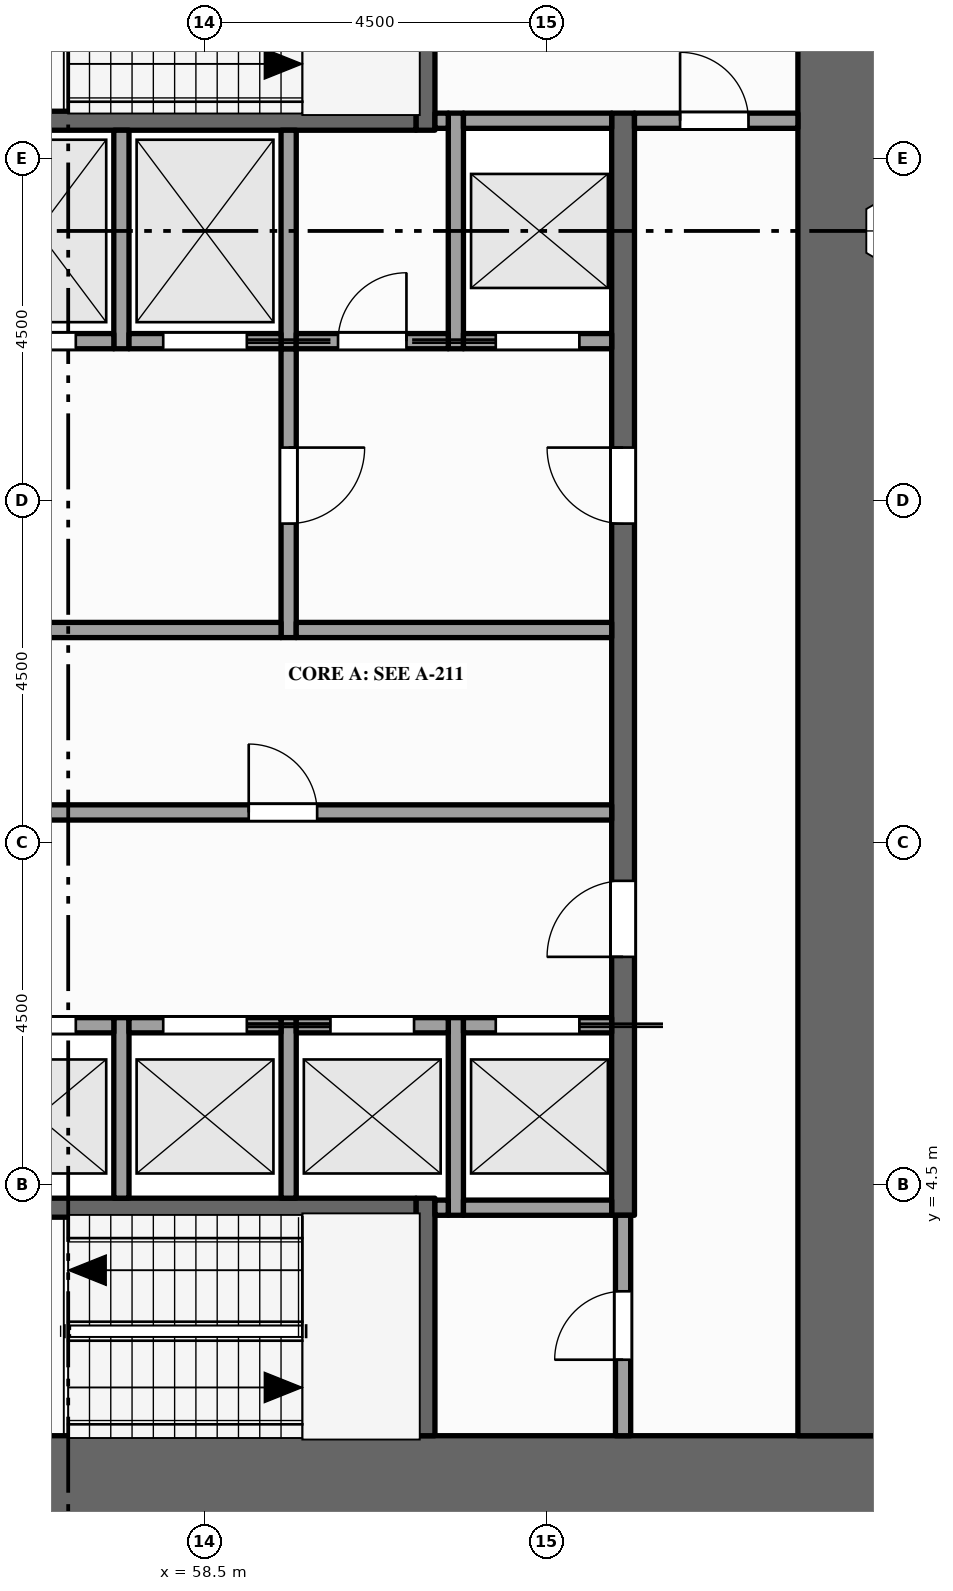
"""IFC4 building model, lengths in metres.
Left out: names, types, materials, properties, quantities, classifications, styles, units other than length and angle.
Written with IfcOpenShell. Run it as: python <this file> out.ifc"""

import sys

from ifc_helpers import new_model, si_unit, direction, frame, frame_2d, origin, place, context, subcontext, project, spatial, rectangle, extrude, element, fill, save


model = new_model("IFC4")
c1 = context("Model", 3, precision=1e-05, world=origin(), true_north=direction((0.0, 1.0)))
c2 = subcontext(c1, "Body", "Model", "MODEL_VIEW")
j1 = project(units=[si_unit("LENGTHUNIT", "METRE"), si_unit("PLANEANGLEUNIT", "RADIAN")], contexts=[c1])
p1 = place(None, origin())
s1 = spatial("IfcSite", under=j1, at=p1, CompositionType="ELEMENT")
p2 = place(p1, origin())
s2 = spatial("IfcBuilding", under=s1, at=p2, CompositionType="ELEMENT")
p3 = place(p2, frame((0.0, 0.0, 57.0)))
s3 = spatial("IfcBuildingStorey", under=s2, at=p3, CompositionType="ELEMENT", Elevation=57.0)
p4 = place(p3, frame((67.5, 0.6, -0.15), z_axis=(0.0, 0.0, 1.0), x_axis=(-1.0, 0.0, 0.0)))
e1 = element("IfcWall", 1, at=p4, inside=s3, PredefinedType="SHEAR", context=c2, shape_type="SweptSolid", body=[
    extrude(rectangle(XDim=13.5, YDim=1.2, at=frame_2d((6.75, 0.0))), origin(), (0.0, 0.0, 1.0), 4.0),
])
p5 = place(p3, frame((66.9, 1.2, -0.15), z_axis=(0.0, 0.0, 1.0), x_axis=(0.0, 1.0, 0.0)))
e2 = element("IfcWall", 2, at=p5, inside=s3, PredefinedType="SHEAR", context=c2, shape_type="SweptSolid", body=[
    extrude(rectangle(XDim=20.1, YDim=1.2, at=frame_2d((10.05, 0.0))), origin(), (0.0, 0.0, 1.0), 4.0),
])
p6 = place(p3, frame((57.4, 4.325, 0.0), z_axis=(0.0, 0.0, 1.0), x_axis=(0.0, 1.0, 0.0)))
e3 = element("IfcWall", 3, at=p6, inside=s3, PredefinedType="SOLIDWALL", context=c2, shape_type="SweptSolid", body=[
    extrude(rectangle(XDim=2.375, YDim=0.2, at=frame_2d((1.188, 0.0))), origin(), (0.0, 0.0, 1.0), 3.85),
])
p7 = place(p3, frame((57.4, 15.5, 0.0), z_axis=(0.0, 0.0, 1.0), x_axis=(0.0, 1.0, 0.0)))
e4 = element("IfcWall", 4, at=p7, inside=s3, PredefinedType="SOLIDWALL", context=c2, shape_type="SweptSolid", body=[
    extrude(rectangle(XDim=2.875, YDim=0.2, at=frame_2d((1.438, 0.0))), origin(), (0.0, 0.0, 1.0), 3.85),
])
p8 = place(p3, frame((59.6, 4.325, 0.0), z_axis=(0.0, 0.0, 1.0), x_axis=(0.0, 1.0, 0.0)))
e5 = element("IfcWall", 5, at=p8, inside=s3, PredefinedType="SOLIDWALL", context=c2, shape_type="SweptSolid", body=[
    extrude(rectangle(XDim=2.375, YDim=0.2, at=frame_2d((1.188, 0.0))), origin(), (0.0, 0.0, 1.0), 3.85),
])
p9 = place(p3, frame((59.6, 11.7, 0.0), z_axis=(0.0, 0.0, 1.0), x_axis=(0.0, 1.0, 0.0)))
e6 = element("IfcWall", 6, at=p9, inside=s3, PredefinedType="PARTITIONING", context=c2, shape_type="SweptSolid", body=[
    extrude(rectangle(XDim=3.8, YDim=0.2, at=frame_2d((1.9, 0.0))), origin(), (0.0, 0.0, 1.0), 3.85),
])
p10 = place(p9, frame((1.5, 0.0, 0.0)))
e7 = element("IfcOpeningElement", 7, at=p10, cuts=e6, PredefinedType="OPENING", context=c2, shape_type="SweptSolid", body=[
    extrude(rectangle(XDim=1.0, YDim=2.1, at=frame_2d((0.5, 1.05))), frame((0.0, 0.11, 0.0), z_axis=(0.0, -1.0, 0.0), x_axis=(1.0, 0.0, 0.0)), (0.0, 0.0, 1.0), 0.22),
])
p11 = place(p3, frame((59.6, 15.5, 0.0), z_axis=(0.0, 0.0, 1.0), x_axis=(0.0, 1.0, 0.0)))
e8 = element("IfcWall", 8, at=p11, inside=s3, PredefinedType="SOLIDWALL", context=c2, shape_type="SweptSolid", body=[
    extrude(rectangle(XDim=2.875, YDim=0.2, at=frame_2d((1.438, 0.0))), origin(), (0.0, 0.0, 1.0), 3.85),
])
p12 = place(p3, frame((61.4, 1.2, 0.0), z_axis=(0.0, 0.0, 1.0), x_axis=(0.0, 1.0, 0.0)))
e9 = element("IfcWall", 9, at=p12, inside=s3, PredefinedType="SHEAR", context=c2, shape_type="SweptSolid", body=[
    extrude(rectangle(XDim=3.125, YDim=0.25, at=frame_2d((1.562, 0.0))), origin(), (0.0, 0.0, 1.0), 3.85),
])
p13 = place(p3, frame((61.4, 18.375, 0.0), z_axis=(0.0, 0.0, 1.0), x_axis=(0.0, 1.0, 0.0)))
e10 = element("IfcWall", 10, at=p13, inside=s3, PredefinedType="SHEAR", context=c2, shape_type="SweptSolid", body=[
    extrude(rectangle(XDim=2.925, YDim=0.25, at=frame_2d((1.462, 0.0))), origin(), (0.0, 0.0, 1.0), 3.85),
])
p14 = place(p3, frame((61.8, 4.1, 0.0), z_axis=(0.0, 0.0, 1.0), x_axis=(0.0, 1.0, 0.0)))
e11 = element("IfcWall", 11, at=p14, inside=s3, PredefinedType="SOLIDWALL", context=c2, shape_type="SweptSolid", body=[
    extrude(rectangle(XDim=2.6, YDim=0.2, at=frame_2d((1.3, 0.0))), origin(), (0.0, 0.0, 1.0), 3.85),
])
p15 = place(p3, frame((61.8, 15.5, 0.0), z_axis=(0.0, 0.0, 1.0), x_axis=(0.0, 1.0, 0.0)))
e12 = element("IfcWall", 12, at=p15, inside=s3, PredefinedType="SOLIDWALL", context=c2, shape_type="SweptSolid", body=[
    extrude(rectangle(XDim=3.1, YDim=0.2, at=frame_2d((1.55, 0.0))), origin(), (0.0, 0.0, 1.0), 3.85),
])
p16 = place(p3, frame((64.0, 1.2, 0.0), z_axis=(0.0, 0.0, 1.0), x_axis=(0.0, 1.0, 0.0)))
e13 = element("IfcWall", 13, at=p16, inside=s3, PredefinedType="PARTITIONING", context=c2, shape_type="SweptSolid", body=[
    extrude(rectangle(XDim=2.9, YDim=0.2, at=frame_2d((1.45, 0.0))), origin(), (0.0, 0.0, 1.0), 3.85),
])
p17 = place(p16, frame((1.0, 0.0, 0.0)))
e14 = element("IfcOpeningElement", 14, at=p17, cuts=e13, PredefinedType="OPENING", context=c2, shape_type="SweptSolid", body=[
    extrude(rectangle(XDim=0.9, YDim=2.1, at=frame_2d((0.45, 1.05))), frame((0.0, 0.11, 0.0), z_axis=(0.0, -1.0, 0.0), x_axis=(1.0, 0.0, 0.0)), (0.0, 0.0, 1.0), 0.22),
])
p18 = place(p3, frame((64.0, 4.1, 0.0), z_axis=(0.0, 0.0, 1.0), x_axis=(0.0, 1.0, 0.0)))
e15 = element("IfcWall", 15, at=p18, inside=s3, PredefinedType="SHEAR", context=c2, shape_type="SweptSolid", body=[
    extrude(rectangle(XDim=14.5, YDim=0.3, at=frame_2d((7.25, 0.0))), origin(), (0.0, 0.0, 1.0), 3.85),
])
p19 = place(p18, frame((3.4, 0.0, 0.0)))
e16 = element("IfcOpeningElement", 16, at=p19, cuts=e15, PredefinedType="OPENING", context=c2, shape_type="SweptSolid", body=[
    extrude(rectangle(XDim=1.0, YDim=2.1, at=frame_2d((0.5, 1.05))), frame((0.0, 0.16, 0.0), z_axis=(0.0, -1.0, 0.0), x_axis=(1.0, 0.0, 0.0)), (0.0, 0.0, 1.0), 0.32),
])
p20 = place(p18, frame((9.1, 0.0, 0.0)))
e17 = element("IfcOpeningElement", 17, at=p20, cuts=e15, PredefinedType="OPENING", context=c2, shape_type="SweptSolid", body=[
    extrude(rectangle(XDim=1.0, YDim=2.1, at=frame_2d((0.5, 1.05))), frame((0.0, 0.16, 0.0), z_axis=(0.0, -1.0, 0.0), x_axis=(1.0, 0.0, 0.0)), (0.0, 0.0, 1.0), 0.32),
])
p21 = place(p3, frame((55.2, 4.2, 0.0), z_axis=(0.0, 0.0, 1.0), x_axis=(1.0, 0.0, 0.0)))
e18 = element("IfcWall", 18, at=p21, inside=s3, PredefinedType="SHEAR", context=c2, shape_type="SweptSolid", body=[
    extrude(rectangle(XDim=6.075, YDim=0.25, at=frame_2d((3.038, 0.0))), origin(), (0.0, 0.0, 1.0), 3.85),
])
p22 = place(p3, frame((61.525, 4.2, 0.0), z_axis=(0.0, 0.0, 1.0), x_axis=(1.0, 0.0, 0.0)))
e19 = element("IfcWall", 19, at=p22, inside=s3, PredefinedType="SOLIDWALL", context=c2, shape_type="SweptSolid", body=[
    extrude(rectangle(XDim=0.175, YDim=0.2, at=frame_2d((0.087, 0.0))), origin(), (0.0, 0.0, 1.0), 3.85),
])
p23 = place(p3, frame((61.9, 4.2, 0.0), z_axis=(0.0, 0.0, 1.0), x_axis=(1.0, 0.0, 0.0)))
e20 = element("IfcWall", 20, at=p23, inside=s3, PredefinedType="SOLIDWALL", context=c2, shape_type="SweptSolid", body=[
    extrude(rectangle(XDim=1.95, YDim=0.2, at=frame_2d((0.975, 0.0))), origin(), (0.0, 0.0, 1.0), 3.85),
])
p24 = place(p3, frame((55.2, 6.6, 0.0), z_axis=(0.0, 0.0, 1.0), x_axis=(1.0, 0.0, 0.0)))
e21 = element("IfcWall", 21, at=p24, inside=s3, PredefinedType="SOLIDWALL", context=c2, shape_type="SweptSolid", body=[
    extrude(rectangle(XDim=2.1, YDim=0.2, at=frame_2d((1.05, 0.0))), origin(), (0.0, 0.0, 1.0), 3.85),
])
p25 = place(p24, frame((0.5, 0.0, 0.012)))
e22 = element("IfcOpeningElement", 22, at=p25, cuts=e21, PredefinedType="OPENING", context=c2, shape_type="SweptSolid", body=[
    extrude(rectangle(XDim=1.1, YDim=2.1, at=frame_2d((0.55, 1.05))), frame((0.0, 0.11, 0.0), z_axis=(0.0, -1.0, 0.0), x_axis=(1.0, 0.0, 0.0)), (0.0, 0.0, 1.0), 0.22),
])
p26 = place(p3, frame((57.5, 6.6, 0.0), z_axis=(0.0, 0.0, 1.0), x_axis=(1.0, 0.0, 0.0)))
e23 = element("IfcWall", 23, at=p26, inside=s3, PredefinedType="SOLIDWALL", context=c2, shape_type="SweptSolid", body=[
    extrude(rectangle(XDim=2.0, YDim=0.2, at=frame_2d((1.0, 0.0))), origin(), (0.0, 0.0, 1.0), 3.85),
])
p27 = place(p26, frame((0.45, 0.0, 0.012)))
e24 = element("IfcOpeningElement", 24, at=p27, cuts=e23, PredefinedType="OPENING", context=c2, shape_type="SweptSolid", body=[
    extrude(rectangle(XDim=1.1, YDim=2.1, at=frame_2d((0.55, 1.05))), frame((0.0, 0.11, 0.0), z_axis=(0.0, -1.0, 0.0), x_axis=(1.0, 0.0, 0.0)), (0.0, 0.0, 1.0), 0.22),
])
p28 = place(p3, frame((59.7, 6.6, 0.0), z_axis=(0.0, 0.0, 1.0), x_axis=(1.0, 0.0, 0.0)))
e25 = element("IfcWall", 25, at=p28, inside=s3, PredefinedType="SOLIDWALL", context=c2, shape_type="SweptSolid", body=[
    extrude(rectangle(XDim=2.0, YDim=0.2, at=frame_2d((1.0, 0.0))), origin(), (0.0, 0.0, 1.0), 3.85),
])
p29 = place(p28, frame((0.45, 0.0, 0.012)))
e26 = element("IfcOpeningElement", 26, at=p29, cuts=e25, PredefinedType="OPENING", context=c2, shape_type="SweptSolid", body=[
    extrude(rectangle(XDim=1.1, YDim=2.1, at=frame_2d((0.55, 1.05))), frame((0.0, 0.11, 0.0), z_axis=(0.0, -1.0, 0.0), x_axis=(1.0, 0.0, 0.0)), (0.0, 0.0, 1.0), 0.22),
])
p30 = place(p3, frame((61.9, 6.6, 0.0), z_axis=(0.0, 0.0, 1.0), x_axis=(1.0, 0.0, 0.0)))
e27 = element("IfcWall", 27, at=p30, inside=s3, PredefinedType="SOLIDWALL", context=c2, shape_type="SweptSolid", body=[
    extrude(rectangle(XDim=1.95, YDim=0.2, at=frame_2d((0.975, 0.0))), origin(), (0.0, 0.0, 1.0), 3.85),
])
p31 = place(p30, frame((0.425, 0.0, 0.012)))
e28 = element("IfcOpeningElement", 28, at=p31, cuts=e27, PredefinedType="OPENING", context=c2, shape_type="SweptSolid", body=[
    extrude(rectangle(XDim=1.1, YDim=2.1, at=frame_2d((0.55, 1.05))), frame((0.0, 0.11, 0.0), z_axis=(0.0, -1.0, 0.0), x_axis=(1.0, 0.0, 0.0)), (0.0, 0.0, 1.0), 0.22),
])
p32 = place(p3, frame((55.2, 9.4, 0.0), z_axis=(0.0, 0.0, 1.0), x_axis=(1.0, 0.0, 0.0)))
e29 = element("IfcWall", 29, at=p32, inside=s3, PredefinedType="PARTITIONING", context=c2, shape_type="SweptSolid", body=[
    extrude(rectangle(XDim=8.65, YDim=0.2, at=frame_2d((4.325, 0.0))), origin(), (0.0, 0.0, 1.0), 3.85),
])
p33 = place(p32, frame((3.875, 0.0, 0.0)))
e30 = element("IfcOpeningElement", 30, at=p33, cuts=e29, PredefinedType="OPENING", context=c2, shape_type="SweptSolid", body=[
    extrude(rectangle(XDim=0.9, YDim=2.1, at=frame_2d((0.45, 1.05))), frame((0.0, 0.11, 0.0), z_axis=(0.0, -1.0, 0.0), x_axis=(1.0, 0.0, 0.0)), (0.0, 0.0, 1.0), 0.22),
])
p34 = place(p3, frame((55.2, 11.8, 0.0), z_axis=(0.0, 0.0, 1.0), x_axis=(1.0, 0.0, 0.0)))
e31 = element("IfcWall", 31, at=p34, inside=s3, PredefinedType="PARTITIONING", context=c2, shape_type="SweptSolid", body=[
    extrude(rectangle(XDim=4.3, YDim=0.2, at=frame_2d((2.15, 0.0))), origin(), (0.0, 0.0, 1.0), 3.85),
])
p35 = place(p3, frame((59.7, 11.8, 0.0), z_axis=(0.0, 0.0, 1.0), x_axis=(1.0, 0.0, 0.0)))
e32 = element("IfcWall", 32, at=p35, inside=s3, PredefinedType="PARTITIONING", context=c2, shape_type="SweptSolid", body=[
    extrude(rectangle(XDim=4.15, YDim=0.2, at=frame_2d((2.075, 0.0))), origin(), (0.0, 0.0, 1.0), 3.85),
])
p36 = place(p3, frame((55.2, 15.6, 0.0), z_axis=(0.0, 0.0, 1.0), x_axis=(1.0, 0.0, 0.0)))
e33 = element("IfcWall", 33, at=p36, inside=s3, PredefinedType="SOLIDWALL", context=c2, shape_type="SweptSolid", body=[
    extrude(rectangle(XDim=2.1, YDim=0.2, at=frame_2d((1.05, 0.0))), origin(), (0.0, 0.0, 1.0), 3.85),
])
p37 = place(p36, frame((0.5, 0.0, 0.012)))
e34 = element("IfcOpeningElement", 34, at=p37, cuts=e33, PredefinedType="OPENING", context=c2, shape_type="SweptSolid", body=[
    extrude(rectangle(XDim=1.1, YDim=2.1, at=frame_2d((0.55, 1.05))), frame((0.0, 0.11, 0.0), z_axis=(0.0, -1.0, 0.0), x_axis=(1.0, 0.0, 0.0)), (0.0, 0.0, 1.0), 0.22),
])
p38 = place(p3, frame((57.5, 15.6, 0.0), z_axis=(0.0, 0.0, 1.0), x_axis=(1.0, 0.0, 0.0)))
e35 = element("IfcWall", 35, at=p38, inside=s3, PredefinedType="SOLIDWALL", context=c2, shape_type="SweptSolid", body=[
    extrude(rectangle(XDim=2.0, YDim=0.2, at=frame_2d((1.0, 0.0))), origin(), (0.0, 0.0, 1.0), 3.85),
])
p39 = place(p38, frame((0.45, 0.0, 0.012)))
e36 = element("IfcOpeningElement", 36, at=p39, cuts=e35, PredefinedType="OPENING", context=c2, shape_type="SweptSolid", body=[
    extrude(rectangle(XDim=1.1, YDim=2.1, at=frame_2d((0.55, 1.05))), frame((0.0, 0.11, 0.0), z_axis=(0.0, -1.0, 0.0), x_axis=(1.0, 0.0, 0.0)), (0.0, 0.0, 1.0), 0.22),
])
p40 = place(p3, frame((59.7, 15.6, 0.0), z_axis=(0.0, 0.0, 1.0), x_axis=(1.0, 0.0, 0.0)))
e37 = element("IfcWall", 37, at=p40, inside=s3, PredefinedType="PARTITIONING", context=c2, shape_type="SweptSolid", body=[
    extrude(rectangle(XDim=2.0, YDim=0.2, at=frame_2d((1.0, 0.0))), origin(), (0.0, 0.0, 1.0), 3.85),
])
p41 = place(p40, frame((0.55, 0.0, 0.0)))
e38 = element("IfcOpeningElement", 38, at=p41, cuts=e37, PredefinedType="OPENING", context=c2, shape_type="SweptSolid", body=[
    extrude(rectangle(XDim=0.9, YDim=2.1, at=frame_2d((0.45, 1.05))), frame((0.0, 0.11, 0.0), z_axis=(0.0, -1.0, 0.0), x_axis=(1.0, 0.0, 0.0)), (0.0, 0.0, 1.0), 0.22),
])
p42 = place(p3, frame((61.9, 15.6, 0.0), z_axis=(0.0, 0.0, 1.0), x_axis=(1.0, 0.0, 0.0)))
e39 = element("IfcWall", 39, at=p42, inside=s3, PredefinedType="SOLIDWALL", context=c2, shape_type="SweptSolid", body=[
    extrude(rectangle(XDim=1.95, YDim=0.2, at=frame_2d((0.975, 0.0))), origin(), (0.0, 0.0, 1.0), 3.85),
])
p43 = place(p42, frame((0.425, 0.0, 0.012)))
e40 = element("IfcOpeningElement", 40, at=p43, cuts=e39, PredefinedType="OPENING", context=c2, shape_type="SweptSolid", body=[
    extrude(rectangle(XDim=1.1, YDim=2.1, at=frame_2d((0.55, 1.05))), frame((0.0, 0.11, 0.0), z_axis=(0.0, -1.0, 0.0), x_axis=(1.0, 0.0, 0.0)), (0.0, 0.0, 1.0), 0.22),
])
p44 = place(p3, frame((55.2, 18.5, 0.0), z_axis=(0.0, 0.0, 1.0), x_axis=(1.0, 0.0, 0.0)))
e41 = element("IfcWall", 41, at=p44, inside=s3, PredefinedType="SHEAR", context=c2, shape_type="SweptSolid", body=[
    extrude(rectangle(XDim=6.075, YDim=0.25, at=frame_2d((3.038, 0.0))), origin(), (0.0, 0.0, 1.0), 3.85),
])
p45 = place(p3, frame((61.525, 18.5, 0.0), z_axis=(0.0, 0.0, 1.0), x_axis=(1.0, 0.0, 0.0)))
e42 = element("IfcWall", 42, at=p45, inside=s3, PredefinedType="PARTITIONING", context=c2, shape_type="SweptSolid", body=[
    extrude(rectangle(XDim=0.175, YDim=0.2, at=frame_2d((0.087, 0.0))), origin(), (0.0, 0.0, 1.0), 3.85),
])
p46 = place(p3, frame((61.9, 18.5, 0.0), z_axis=(0.0, 0.0, 1.0), x_axis=(1.0, 0.0, 0.0)))
e43 = element("IfcWall", 43, at=p46, inside=s3, PredefinedType="SOLIDWALL", context=c2, shape_type="SweptSolid", body=[
    extrude(rectangle(XDim=1.95, YDim=0.2, at=frame_2d((0.975, 0.0))), origin(), (0.0, 0.0, 1.0), 3.85),
])
p47 = place(p3, frame((64.15, 18.5, 0.0), z_axis=(0.0, 0.0, 1.0), x_axis=(1.0, 0.0, 0.0)))
e44 = element("IfcWall", 44, at=p47, inside=s3, PredefinedType="PARTITIONING", context=c2, shape_type="SweptSolid", body=[
    extrude(rectangle(XDim=2.15, YDim=0.2, at=frame_2d((1.075, 0.0))), origin(), (0.0, 0.0, 1.0), 3.85),
])
p48 = place(p47, frame((0.6, 0.0, 0.0)))
e45 = element("IfcOpeningElement", 45, at=p48, cuts=e44, PredefinedType="OPENING", context=c2, shape_type="SweptSolid", body=[
    extrude(rectangle(XDim=0.9, YDim=2.1, at=frame_2d((0.45, 1.05))), frame((0.0, 0.11, 0.0), z_axis=(0.0, -1.0, 0.0), x_axis=(1.0, 0.0, 0.0)), (0.0, 0.0, 1.0), 0.22),
])
p49 = place(p25, origin())
e46 = element("IfcDoor", 46, at=p49, inside=s3, OperationType="SLIDING_TO_LEFT", PredefinedType="DOOR", context=c2, shape_type="SweptSolid", body=[
    extrude(rectangle(XDim=1.1, YDim=2.1, at=frame_2d((0.55, 1.05))), frame((0.0, 0.025, 0.0), z_axis=(0.0, -1.0, 0.0), x_axis=(1.0, 0.0, 0.0)), (0.0, 0.0, 1.0), 0.05),
])
fill(e22, e46)
p50 = place(p27, origin())
e47 = element("IfcDoor", 47, at=p50, inside=s3, OperationType="SLIDING_TO_RIGHT", PredefinedType="DOOR", context=c2, shape_type="SweptSolid", body=[
    extrude(rectangle(XDim=1.1, YDim=2.1, at=frame_2d((0.55, 1.05))), frame((0.0, 0.025, 0.0), z_axis=(0.0, -1.0, 0.0), x_axis=(1.0, 0.0, 0.0)), (0.0, 0.0, 1.0), 0.05),
])
fill(e24, e47)
p51 = place(p29, origin())
e48 = element("IfcDoor", 48, at=p51, inside=s3, OperationType="SLIDING_TO_LEFT", PredefinedType="DOOR", context=c2, shape_type="SweptSolid", body=[
    extrude(rectangle(XDim=1.1, YDim=2.1, at=frame_2d((0.55, 1.05))), frame((0.0, 0.025, 0.0), z_axis=(0.0, -1.0, 0.0), x_axis=(1.0, 0.0, 0.0)), (0.0, 0.0, 1.0), 0.05),
])
fill(e26, e48)
p52 = place(p31, origin())
e49 = element("IfcDoor", 49, at=p52, inside=s3, OperationType="SLIDING_TO_RIGHT", PredefinedType="DOOR", context=c2, shape_type="SweptSolid", body=[
    extrude(rectangle(XDim=1.1, YDim=2.1, at=frame_2d((0.55, 1.05))), frame((0.0, 0.025, 0.0), z_axis=(0.0, -1.0, 0.0), x_axis=(1.0, 0.0, 0.0)), (0.0, 0.0, 1.0), 0.05),
])
fill(e28, e49)
p53 = place(p37, origin())
e50 = element("IfcDoor", 50, at=p53, inside=s3, OperationType="SLIDING_TO_LEFT", PredefinedType="DOOR", context=c2, shape_type="SweptSolid", body=[
    extrude(rectangle(XDim=1.1, YDim=2.1, at=frame_2d((0.55, 1.05))), frame((0.0, 0.025, 0.0), z_axis=(0.0, -1.0, 0.0), x_axis=(1.0, 0.0, 0.0)), (0.0, 0.0, 1.0), 0.05),
])
fill(e34, e50)
p54 = place(p39, origin())
e51 = element("IfcDoor", 51, at=p54, inside=s3, OperationType="SLIDING_TO_RIGHT", PredefinedType="DOOR", context=c2, shape_type="SweptSolid", body=[
    extrude(rectangle(XDim=1.1, YDim=2.1, at=frame_2d((0.55, 1.05))), frame((0.0, 0.025, 0.0), z_axis=(0.0, -1.0, 0.0), x_axis=(1.0, 0.0, 0.0)), (0.0, 0.0, 1.0), 0.05),
])
fill(e36, e51)
p55 = place(p43, origin())
e52 = element("IfcDoor", 52, at=p55, inside=s3, OperationType="SLIDING_TO_LEFT", PredefinedType="DOOR", context=c2, shape_type="SweptSolid", body=[
    extrude(rectangle(XDim=1.1, YDim=2.1, at=frame_2d((0.55, 1.05))), frame((0.0, 0.025, 0.0), z_axis=(0.0, -1.0, 0.0), x_axis=(1.0, 0.0, 0.0)), (0.0, 0.0, 1.0), 0.05),
])
fill(e40, e52)
p56 = place(p19, origin())
e53 = element("IfcDoor", 53, at=p56, inside=s3, OperationType="SINGLE_SWING_LEFT", PredefinedType="DOOR", context=c2, shape_type="SweptSolid", body=[
    extrude(rectangle(XDim=1.0, YDim=2.1, at=frame_2d((0.5, 1.05))), frame((0.0, 0.025, 0.0), z_axis=(0.0, -1.0, 0.0), x_axis=(1.0, 0.0, 0.0)), (0.0, 0.0, 1.0), 0.05),
])
fill(e16, e53)
p57 = place(p10, origin())
e54 = element("IfcDoor", 54, at=p57, inside=s3, OperationType="SINGLE_SWING_RIGHT", PredefinedType="DOOR", context=c2, shape_type="SweptSolid", body=[
    extrude(rectangle(XDim=1.0, YDim=2.1, at=frame_2d((0.5, 1.05))), frame((0.0, 0.025, 0.0), z_axis=(0.0, -1.0, 0.0), x_axis=(1.0, 0.0, 0.0)), (0.0, 0.0, 1.0), 0.05),
])
fill(e7, e54)
p58 = place(p20, origin())
e55 = element("IfcDoor", 55, at=p58, inside=s3, OperationType="SINGLE_SWING_RIGHT", PredefinedType="DOOR", context=c2, shape_type="SweptSolid", body=[
    extrude(rectangle(XDim=1.0, YDim=2.1, at=frame_2d((0.5, 1.05))), frame((0.0, 0.025, 0.0), z_axis=(0.0, -1.0, 0.0), x_axis=(1.0, 0.0, 0.0)), (0.0, 0.0, 1.0), 0.05),
])
fill(e17, e55)
p59 = place(p17, origin())
e56 = element("IfcDoor", 56, at=p59, inside=s3, OperationType="SINGLE_SWING_LEFT", PredefinedType="DOOR", context=c2, shape_type="SweptSolid", body=[
    extrude(rectangle(XDim=0.9, YDim=2.1, at=frame_2d((0.45, 1.05))), frame((0.0, 0.025, 0.0), z_axis=(0.0, -1.0, 0.0), x_axis=(1.0, 0.0, 0.0)), (0.0, 0.0, 1.0), 0.05),
])
fill(e14, e56)
p60 = place(p48, origin())
e57 = element("IfcDoor", 57, at=p60, inside=s3, OperationType="SINGLE_SWING_LEFT", PredefinedType="DOOR", context=c2, shape_type="SweptSolid", body=[
    extrude(rectangle(XDim=0.9, YDim=2.1, at=frame_2d((0.45, 1.05))), frame((0.0, 0.025, 0.0), z_axis=(0.0, -1.0, 0.0), x_axis=(1.0, 0.0, 0.0)), (0.0, 0.0, 1.0), 0.05),
])
fill(e45, e57)
p61 = place(p33, origin())
e58 = element("IfcDoor", 58, at=p61, inside=s3, OperationType="SINGLE_SWING_LEFT", PredefinedType="DOOR", context=c2, shape_type="SweptSolid", body=[
    extrude(rectangle(XDim=0.9, YDim=2.1, at=frame_2d((0.45, 1.05))), frame((0.0, 0.025, 0.0), z_axis=(0.0, -1.0, 0.0), x_axis=(1.0, 0.0, 0.0)), (0.0, 0.0, 1.0), 0.05),
])
fill(e30, e58)
p62 = place(p41, origin())
e59 = element("IfcDoor", 59, at=p62, inside=s3, OperationType="SINGLE_SWING_RIGHT", PredefinedType="DOOR", context=c2, shape_type="SweptSolid", body=[
    extrude(rectangle(XDim=0.9, YDim=2.1, at=frame_2d((0.45, 1.05))), frame((0.0, 0.025, 0.0), z_axis=(0.0, -1.0, 0.0), x_axis=(1.0, 0.0, 0.0)), (0.0, 0.0, 1.0), 0.05),
])
fill(e38, e59)
save(model, sys.argv[1])
